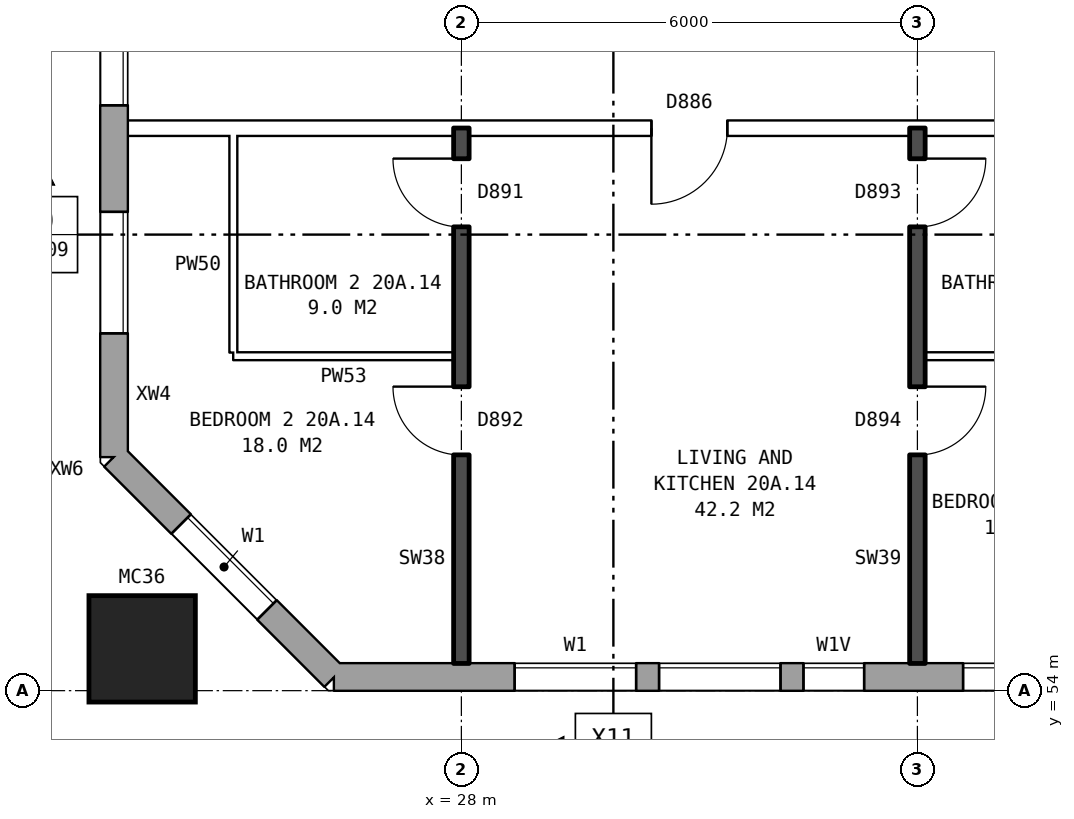
"""IFC4 building model, lengths in metres.
Left out: names, types, materials, properties, quantities, classifications, styles, units other than length and angle.
Written with IfcOpenShell. Run it as: python <this file> out.ifc"""

import sys

from ifc_helpers import new_model, si_unit, direction, frame, frame_2d, origin, origin_2d, place, context, subcontext, project, spatial, rectangle, hollow_rectangle, extrude, element, fill, save


model = new_model("IFC4")
c1 = context("Model", 3, precision=1e-05, world=origin(), true_north=direction((0.0, 1.0)))
c2 = subcontext(c1, "Body", "Model", "MODEL_VIEW")
j1 = project(units=[si_unit("LENGTHUNIT", "METRE"), si_unit("PLANEANGLEUNIT", "RADIAN")], contexts=[c1])
p1 = place(None, origin())
s1 = spatial("IfcSite", under=j1, at=p1, CompositionType="ELEMENT")
p2 = place(p1, origin())
s2 = spatial("IfcBuilding", under=s1, at=p2, CompositionType="ELEMENT")
p3 = place(p2, frame((0.0, 0.0, 74.7)))
s3 = spatial("IfcBuildingStorey", under=s2, at=p3, CompositionType="ELEMENT", Elevation=74.7)
p4 = place(p3, frame((23.8, 54.55, 0.0), z_axis=(0.0, 0.0, 1.0), x_axis=(1.0, 0.0, 0.0)))
e1 = element("IfcColumn", 1, at=p4, inside=s3, PredefinedType="COLUMN", context=c2, shape_type="SweptSolid", body=[
    extrude(hollow_rectangle(XDim=1.4, YDim=1.4, WallThickness=0.075, at=origin_2d()), origin(), (0.0, 0.0, 1.0), 3.1),
])
p5 = place(p3, frame((23.43, 57.075, 0.0), z_axis=(0.0, 0.0, 1.0), x_axis=(0.707106781187, -0.707106781187, 0.0)))
e2 = element("IfcWall", 2, at=p5, inside=s3, PredefinedType="STANDARD", context=c2, shape_type="SweptSolid", body=[
    extrude(rectangle(XDim=4.094, YDim=0.36, at=frame_2d((2.047, 0.0))), origin(), (0.0, 0.0, 1.0), 2.85),
])
p6 = place(p5, frame((1.247, 0.0, 0.8)))
e3 = element("IfcOpeningElement", 3, at=p6, cuts=e2, PredefinedType="OPENING", context=c2, shape_type="SweptSolid", body=[
    extrude(rectangle(XDim=1.6, YDim=1.8, at=frame_2d((0.8, 0.9))), frame((0.0, 0.19, 0.0), z_axis=(0.0, -1.0, 0.0), x_axis=(1.0, 0.0, 0.0)), (0.0, 0.0, 1.0), 0.38),
])
p7 = place(p3, frame((26.325, 54.18, 0.0), z_axis=(0.0, 0.0, 1.0), x_axis=(1.0, 0.0, 0.0)))
e4 = element("IfcWall", 4, at=p7, inside=s3, PredefinedType="STANDARD", context=c2, shape_type="SweptSolid", body=[
    extrude(rectangle(XDim=46.601, YDim=0.36, at=frame_2d((23.3, 0.0))), origin(), (0.0, 0.0, 1.0), 2.85),
])
p8 = place(p7, frame((2.375, 0.0, 0.8)))
e5 = element("IfcOpeningElement", 5, at=p8, cuts=e4, PredefinedType="OPENING", context=c2, shape_type="SweptSolid", body=[
    extrude(rectangle(XDim=1.6, YDim=1.8, at=frame_2d((0.8, 0.9))), frame((0.0, 0.19, 0.0), z_axis=(0.0, -1.0, 0.0), x_axis=(1.0, 0.0, 0.0)), (0.0, 0.0, 1.0), 0.38),
])
p9 = place(p7, frame((4.275, 0.0, 0.8)))
e6 = element("IfcOpeningElement", 6, at=p9, cuts=e4, PredefinedType="OPENING", context=c2, shape_type="SweptSolid", body=[
    extrude(rectangle(XDim=1.6, YDim=1.8, at=frame_2d((0.8, 0.9))), frame((0.0, 0.19, 0.0), z_axis=(0.0, -1.0, 0.0), x_axis=(1.0, 0.0, 0.0)), (0.0, 0.0, 1.0), 0.38),
])
p10 = place(p7, frame((8.275, 0.0, 0.8)))
e7 = element("IfcOpeningElement", 7, at=p10, cuts=e4, PredefinedType="OPENING", context=c2, shape_type="SweptSolid", body=[
    extrude(rectangle(XDim=0.8, YDim=0.9, at=frame_2d((0.4, 0.45))), frame((0.0, 0.19, 0.0), z_axis=(0.0, -1.0, 0.0), x_axis=(1.0, 0.0, 0.0)), (0.0, 0.0, 1.0), 0.38),
])
p11 = place(p7, frame((11.375, 0.0, 0.8)))
e8 = element("IfcOpeningElement", 8, at=p11, cuts=e4, PredefinedType="OPENING", context=c2, shape_type="SweptSolid", body=[
    extrude(rectangle(XDim=1.6, YDim=1.8, at=frame_2d((0.8, 0.9))), frame((0.0, 0.19, 0.0), z_axis=(0.0, -1.0, 0.0), x_axis=(1.0, 0.0, 0.0)), (0.0, 0.0, 1.0), 0.38),
])
p12 = place(p7, frame((14.375, 0.0, 0.8)))
e9 = element("IfcOpeningElement", 9, at=p12, cuts=e4, PredefinedType="OPENING", context=c2, shape_type="SweptSolid", body=[
    extrude(rectangle(XDim=1.6, YDim=1.8, at=frame_2d((0.8, 0.9))), frame((0.0, 0.19, 0.0), z_axis=(0.0, -1.0, 0.0), x_axis=(1.0, 0.0, 0.0)), (0.0, 0.0, 1.0), 0.38),
])
p13 = place(p7, frame((17.375, 0.0, 0.8)))
e10 = element("IfcOpeningElement", 10, at=p13, cuts=e4, PredefinedType="OPENING", context=c2, shape_type="SweptSolid", body=[
    extrude(rectangle(XDim=1.6, YDim=1.8, at=frame_2d((0.8, 0.9))), frame((0.0, 0.19, 0.0), z_axis=(0.0, -1.0, 0.0), x_axis=(1.0, 0.0, 0.0)), (0.0, 0.0, 1.0), 0.38),
])
p14 = place(p7, frame((20.375, 0.0, 0.8)))
e11 = element("IfcOpeningElement", 11, at=p14, cuts=e4, PredefinedType="OPENING", context=c2, shape_type="SweptSolid", body=[
    extrude(rectangle(XDim=1.6, YDim=1.8, at=frame_2d((0.8, 0.9))), frame((0.0, 0.19, 0.0), z_axis=(0.0, -1.0, 0.0), x_axis=(1.0, 0.0, 0.0)), (0.0, 0.0, 1.0), 0.38),
])
p15 = place(p7, frame((23.375, 0.0, 0.8)))
e12 = element("IfcOpeningElement", 12, at=p15, cuts=e4, PredefinedType="OPENING", context=c2, shape_type="SweptSolid", body=[
    extrude(rectangle(XDim=1.6, YDim=1.8, at=frame_2d((0.8, 0.9))), frame((0.0, 0.19, 0.0), z_axis=(0.0, -1.0, 0.0), x_axis=(1.0, 0.0, 0.0)), (0.0, 0.0, 1.0), 0.38),
])
p16 = place(p7, frame((26.375, 0.0, 0.8)))
e13 = element("IfcOpeningElement", 13, at=p16, cuts=e4, PredefinedType="OPENING", context=c2, shape_type="SweptSolid", body=[
    extrude(rectangle(XDim=1.6, YDim=1.8, at=frame_2d((0.8, 0.9))), frame((0.0, 0.19, 0.0), z_axis=(0.0, -1.0, 0.0), x_axis=(1.0, 0.0, 0.0)), (0.0, 0.0, 1.0), 0.38),
])
p17 = place(p7, frame((29.375, 0.0, 0.8)))
e14 = element("IfcOpeningElement", 14, at=p17, cuts=e4, PredefinedType="OPENING", context=c2, shape_type="SweptSolid", body=[
    extrude(rectangle(XDim=1.6, YDim=1.8, at=frame_2d((0.8, 0.9))), frame((0.0, 0.19, 0.0), z_axis=(0.0, -1.0, 0.0), x_axis=(1.0, 0.0, 0.0)), (0.0, 0.0, 1.0), 0.38),
])
p18 = place(p7, frame((32.375, 0.0, 0.8)))
e15 = element("IfcOpeningElement", 15, at=p18, cuts=e4, PredefinedType="OPENING", context=c2, shape_type="SweptSolid", body=[
    extrude(rectangle(XDim=1.6, YDim=1.8, at=frame_2d((0.8, 0.9))), frame((0.0, 0.19, 0.0), z_axis=(0.0, -1.0, 0.0), x_axis=(1.0, 0.0, 0.0)), (0.0, 0.0, 1.0), 0.38),
])
p19 = place(p7, frame((35.375, 0.0, 0.8)))
e16 = element("IfcOpeningElement", 16, at=p19, cuts=e4, PredefinedType="OPENING", context=c2, shape_type="SweptSolid", body=[
    extrude(rectangle(XDim=1.6, YDim=1.8, at=frame_2d((0.8, 0.9))), frame((0.0, 0.19, 0.0), z_axis=(0.0, -1.0, 0.0), x_axis=(1.0, 0.0, 0.0)), (0.0, 0.0, 1.0), 0.38),
])
p20 = place(p7, frame((39.625, 0.0, 1.7)))
e17 = element("IfcOpeningElement", 17, at=p20, cuts=e4, PredefinedType="OPENING", context=c2, shape_type="SweptSolid", body=[
    extrude(rectangle(XDim=1.4, YDim=0.9, at=frame_2d((0.7, 0.45))), frame((0.0, 0.19, 0.0), z_axis=(0.0, -1.0, 0.0), x_axis=(1.0, 0.0, 0.0)), (0.0, 0.0, 1.0), 0.38),
])
p21 = place(p7, frame((41.375, 0.0, 0.8)))
e18 = element("IfcOpeningElement", 18, at=p21, cuts=e4, PredefinedType="OPENING", context=c2, shape_type="SweptSolid", body=[
    extrude(rectangle(XDim=1.6, YDim=1.8, at=frame_2d((0.8, 0.9))), frame((0.0, 0.19, 0.0), z_axis=(0.0, -1.0, 0.0), x_axis=(1.0, 0.0, 0.0)), (0.0, 0.0, 1.0), 0.38),
])
p22 = place(p7, frame((44.375, 0.0, 0.8)))
e19 = element("IfcOpeningElement", 19, at=p22, cuts=e4, PredefinedType="OPENING", context=c2, shape_type="SweptSolid", body=[
    extrude(rectangle(XDim=1.6, YDim=1.8, at=frame_2d((0.8, 0.9))), frame((0.0, 0.19, 0.0), z_axis=(0.0, -1.0, 0.0), x_axis=(1.0, 0.0, 0.0)), (0.0, 0.0, 1.0), 0.38),
])
p23 = place(p7, frame((6.175, 0.0, 1.7)))
e20 = element("IfcOpeningElement", 20, at=p23, cuts=e4, PredefinedType="OPENING", context=c2, shape_type="SweptSolid", body=[
    extrude(rectangle(XDim=0.8, YDim=0.9, at=frame_2d((0.4, 0.45))), frame((0.0, 0.19, 0.0), z_axis=(0.0, -1.0, 0.0), x_axis=(1.0, 0.0, 0.0)), (0.0, 0.0, 1.0), 0.38),
])
p24 = place(p7, frame((9.375, 0.0, 0.8)))
e21 = element("IfcOpeningElement", 21, at=p24, cuts=e4, PredefinedType="OPENING", context=c2, shape_type="SweptSolid", body=[
    extrude(rectangle(XDim=1.0, YDim=1.8, at=frame_2d((0.5, 0.9))), frame((0.0, 0.19, 0.0), z_axis=(0.0, -1.0, 0.0), x_axis=(1.0, 0.0, 0.0)), (0.0, 0.0, 1.0), 0.38),
])
p25 = place(p3, frame((23.43, 82.925, 0.0), z_axis=(0.0, 0.0, 1.0), x_axis=(0.0, -1.0, 0.0)))
e22 = element("IfcWall", 22, at=p25, inside=s3, PredefinedType="STANDARD", context=c2, shape_type="SweptSolid", body=[
    extrude(rectangle(XDim=25.851, YDim=0.36, at=frame_2d((12.925, 0.0))), origin(), (0.0, 0.0, 1.0), 2.85),
])
p26 = place(p25, frame((1.625, 0.0, 0.8)))
e23 = element("IfcOpeningElement", 23, at=p26, cuts=e22, PredefinedType="OPENING", context=c2, shape_type="SweptSolid", body=[
    extrude(rectangle(XDim=1.6, YDim=1.8, at=frame_2d((0.8, 0.9))), frame((0.0, 0.19, 0.0), z_axis=(0.0, -1.0, 0.0), x_axis=(1.0, 0.0, 0.0)), (0.0, 0.0, 1.0), 0.38),
])
p27 = place(p25, frame((4.625, 0.0, 0.8)))
e24 = element("IfcOpeningElement", 24, at=p27, cuts=e22, PredefinedType="OPENING", context=c2, shape_type="SweptSolid", body=[
    extrude(rectangle(XDim=1.6, YDim=1.8, at=frame_2d((0.8, 0.9))), frame((0.0, 0.19, 0.0), z_axis=(0.0, -1.0, 0.0), x_axis=(1.0, 0.0, 0.0)), (0.0, 0.0, 1.0), 0.38),
])
p28 = place(p25, frame((6.525, 0.0, 0.8)))
e25 = element("IfcOpeningElement", 25, at=p28, cuts=e22, PredefinedType="OPENING", context=c2, shape_type="SweptSolid", body=[
    extrude(rectangle(XDim=1.2, YDim=1.8, at=frame_2d((0.6, 0.9))), frame((0.0, 0.19, 0.0), z_axis=(0.0, -1.0, 0.0), x_axis=(1.0, 0.0, 0.0)), (0.0, 0.0, 1.0), 0.38),
])
p29 = place(p25, frame((8.025, 0.0, 1.7)))
e26 = element("IfcOpeningElement", 26, at=p29, cuts=e22, PredefinedType="OPENING", context=c2, shape_type="SweptSolid", body=[
    extrude(rectangle(XDim=1.0, YDim=0.9, at=frame_2d((0.5, 0.45))), frame((0.0, 0.19, 0.0), z_axis=(0.0, -1.0, 0.0), x_axis=(1.0, 0.0, 0.0)), (0.0, 0.0, 1.0), 0.38),
])
p30 = place(p25, frame((10.125, 0.0, 0.8)))
e27 = element("IfcOpeningElement", 27, at=p30, cuts=e22, PredefinedType="OPENING", context=c2, shape_type="SweptSolid", body=[
    extrude(rectangle(XDim=0.8, YDim=0.9, at=frame_2d((0.4, 0.45))), frame((0.0, 0.19, 0.0), z_axis=(0.0, -1.0, 0.0), x_axis=(1.0, 0.0, 0.0)), (0.0, 0.0, 1.0), 0.38),
])
p31 = place(p25, frame((11.375, 0.0, 0.8)))
e28 = element("IfcOpeningElement", 28, at=p31, cuts=e22, PredefinedType="OPENING", context=c2, shape_type="SweptSolid", body=[
    extrude(rectangle(XDim=1.2, YDim=1.8, at=frame_2d((0.6, 0.9))), frame((0.0, 0.19, 0.0), z_axis=(0.0, -1.0, 0.0), x_axis=(1.0, 0.0, 0.0)), (0.0, 0.0, 1.0), 0.38),
])
p32 = place(p25, frame((19.625, 0.0, 0.8)))
e29 = element("IfcOpeningElement", 29, at=p32, cuts=e22, PredefinedType="OPENING", context=c2, shape_type="SweptSolid", body=[
    extrude(rectangle(XDim=1.6, YDim=1.8, at=frame_2d((0.8, 0.9))), frame((0.0, 0.19, 0.0), z_axis=(0.0, -1.0, 0.0), x_axis=(1.0, 0.0, 0.0)), (0.0, 0.0, 1.0), 0.38),
])
p33 = place(p25, frame((22.625, 0.0, 0.8)))
e30 = element("IfcOpeningElement", 30, at=p33, cuts=e22, PredefinedType="OPENING", context=c2, shape_type="SweptSolid", body=[
    extrude(rectangle(XDim=1.6, YDim=1.8, at=frame_2d((0.8, 0.9))), frame((0.0, 0.19, 0.0), z_axis=(0.0, -1.0, 0.0), x_axis=(1.0, 0.0, 0.0)), (0.0, 0.0, 1.0), 0.38),
])
p34 = place(p25, frame((12.875, 0.0, 0.8)))
e31 = element("IfcOpeningElement", 31, at=p34, cuts=e22, PredefinedType="OPENING", context=c2, shape_type="SweptSolid", body=[
    extrude(rectangle(XDim=1.6, YDim=1.8, at=frame_2d((0.8, 0.9))), frame((0.0, 0.19, 0.0), z_axis=(0.0, -1.0, 0.0), x_axis=(1.0, 0.0, 0.0)), (0.0, 0.0, 1.0), 0.38),
])
p35 = place(p25, frame((14.775, 0.0, 0.8)))
e32 = element("IfcOpeningElement", 32, at=p35, cuts=e22, PredefinedType="OPENING", context=c2, shape_type="SweptSolid", body=[
    extrude(rectangle(XDim=0.8, YDim=0.9, at=frame_2d((0.4, 0.45))), frame((0.0, 0.19, 0.0), z_axis=(0.0, -1.0, 0.0), x_axis=(1.0, 0.0, 0.0)), (0.0, 0.0, 1.0), 0.38),
])
p36 = place(p25, frame((16.725, 0.0, 1.7)))
e33 = element("IfcOpeningElement", 33, at=p36, cuts=e22, PredefinedType="OPENING", context=c2, shape_type="SweptSolid", body=[
    extrude(rectangle(XDim=1.0, YDim=0.9, at=frame_2d((0.5, 0.45))), frame((0.0, 0.19, 0.0), z_axis=(0.0, -1.0, 0.0), x_axis=(1.0, 0.0, 0.0)), (0.0, 0.0, 1.0), 0.38),
])
p37 = place(p25, frame((18.025, 0.0, 0.8)))
e34 = element("IfcOpeningElement", 34, at=p37, cuts=e22, PredefinedType="OPENING", context=c2, shape_type="SweptSolid", body=[
    extrude(rectangle(XDim=1.2, YDim=1.8, at=frame_2d((0.6, 0.9))), frame((0.0, 0.19, 0.0), z_axis=(0.0, -1.0, 0.0), x_axis=(1.0, 0.0, 0.0)), (0.0, 0.0, 1.0), 0.38),
])
p38 = place(p3, frame((25.0, 58.4, 0.0), z_axis=(0.0, 0.0, 1.0), x_axis=(1.0, 0.0, 0.0)))
e35 = element("IfcWall", 35, at=p38, inside=s3, PredefinedType="PARTITIONING", context=c2, shape_type="SweptSolid", body=[
    extrude(rectangle(XDim=2.9, YDim=0.1, at=frame_2d((1.45, 0.0))), origin(), (0.0, 0.0, 1.0), 2.85),
])
p39 = place(p3, frame((34.1, 58.4, 0.0), z_axis=(0.0, 0.0, 1.0), x_axis=(1.0, 0.0, 0.0)))
e36 = element("IfcWall", 36, at=p39, inside=s3, PredefinedType="PARTITIONING", context=c2, shape_type="SweptSolid", body=[
    extrude(rectangle(XDim=2.8, YDim=0.1, at=frame_2d((1.4, 0.0))), origin(), (0.0, 0.0, 1.0), 2.85),
])
p40 = place(p3, frame((23.61, 61.4, 0.0), z_axis=(0.0, 0.0, 1.0), x_axis=(1.0, 0.0, 0.0)))
e37 = element("IfcWall", 37, at=p40, inside=s3, PredefinedType="PARTITIONING", context=c2, shape_type="SweptSolid", body=[
    extrude(rectangle(XDim=22.29, YDim=0.2, at=frame_2d((11.145, 0.0))), origin(), (0.0, 0.0, 1.0), 2.85),
])
p41 = place(p40, frame((18.84, 0.0, 0.0)))
e38 = element("IfcOpeningElement", 38, at=p41, cuts=e37, PredefinedType="OPENING", context=c2, shape_type="SweptSolid", body=[
    extrude(rectangle(XDim=1.0, YDim=2.1, at=frame_2d((0.5, 1.05))), frame((0.0, 0.11, 0.0), z_axis=(0.0, -1.0, 0.0), x_axis=(1.0, 0.0, 0.0)), (0.0, 0.0, 1.0), 0.22),
])
p42 = place(p40, frame((6.89, 0.0, 0.0)))
e39 = element("IfcOpeningElement", 39, at=p42, cuts=e37, PredefinedType="OPENING", context=c2, shape_type="SweptSolid", body=[
    extrude(rectangle(XDim=1.0, YDim=2.1, at=frame_2d((0.5, 1.05))), frame((0.0, 0.11, 0.0), z_axis=(0.0, -1.0, 0.0), x_axis=(1.0, 0.0, 0.0)), (0.0, 0.0, 1.0), 0.22),
])
p43 = place(p3, frame((25.0, 58.45, 0.0), z_axis=(0.0, 0.0, 1.0), x_axis=(0.0, 1.0, 0.0)))
e40 = element("IfcWall", 40, at=p43, inside=s3, PredefinedType="PARTITIONING", context=c2, shape_type="SweptSolid", body=[
    extrude(rectangle(XDim=2.85, YDim=0.1, at=frame_2d((1.425, 0.0))), origin(), (0.0, 0.0, 1.0), 2.85),
])
p44 = place(p3, frame((28.0, 54.36, 0.0), z_axis=(0.0, 0.0, 1.0), x_axis=(0.0, 1.0, 0.0)))
e41 = element("IfcWall", 41, at=p44, inside=s3, PredefinedType="SOLIDWALL", context=c2, shape_type="SweptSolid", body=[
    extrude(rectangle(XDim=7.04, YDim=0.2, at=frame_2d((3.52, 0.0))), origin(), (0.0, 0.0, 1.0), 2.85),
])
p45 = place(p44, frame((2.74, 0.0, 0.0)))
e42 = element("IfcOpeningElement", 42, at=p45, cuts=e41, PredefinedType="OPENING", context=c2, shape_type="SweptSolid", body=[
    extrude(rectangle(XDim=0.9, YDim=2.1, at=frame_2d((0.45, 1.05))), frame((0.0, 0.11, 0.0), z_axis=(0.0, -1.0, 0.0), x_axis=(1.0, 0.0, 0.0)), (0.0, 0.0, 1.0), 0.22),
])
p46 = place(p44, frame((5.74, 0.0, 0.0)))
e43 = element("IfcOpeningElement", 43, at=p46, cuts=e41, PredefinedType="OPENING", context=c2, shape_type="SweptSolid", body=[
    extrude(rectangle(XDim=0.9, YDim=2.1, at=frame_2d((0.45, 1.05))), frame((0.0, 0.11, 0.0), z_axis=(0.0, -1.0, 0.0), x_axis=(1.0, 0.0, 0.0)), (0.0, 0.0, 1.0), 0.22),
])
p47 = place(p3, frame((34.0, 54.36, 0.0), z_axis=(0.0, 0.0, 1.0), x_axis=(0.0, 1.0, 0.0)))
e44 = element("IfcWall", 44, at=p47, inside=s3, PredefinedType="SOLIDWALL", context=c2, shape_type="SweptSolid", body=[
    extrude(rectangle(XDim=7.04, YDim=0.2, at=frame_2d((3.52, 0.0))), origin(), (0.0, 0.0, 1.0), 2.85),
])
p48 = place(p47, frame((2.74, 0.0, 0.0)))
e45 = element("IfcOpeningElement", 45, at=p48, cuts=e44, PredefinedType="OPENING", context=c2, shape_type="SweptSolid", body=[
    extrude(rectangle(XDim=0.9, YDim=2.1, at=frame_2d((0.45, 1.05))), frame((0.0, 0.11, 0.0), z_axis=(0.0, -1.0, 0.0), x_axis=(1.0, 0.0, 0.0)), (0.0, 0.0, 1.0), 0.22),
])
p49 = place(p47, frame((5.74, 0.0, 0.0)))
e46 = element("IfcOpeningElement", 46, at=p49, cuts=e44, PredefinedType="OPENING", context=c2, shape_type="SweptSolid", body=[
    extrude(rectangle(XDim=0.9, YDim=2.1, at=frame_2d((0.45, 1.05))), frame((0.0, 0.11, 0.0), z_axis=(0.0, -1.0, 0.0), x_axis=(1.0, 0.0, 0.0)), (0.0, 0.0, 1.0), 0.22),
])
p50 = place(p6, origin())
e47 = element("IfcWindow", 47, at=p50, inside=s3, PartitioningType="SINGLE_PANEL", PredefinedType="WINDOW", context=c2, shape_type="SweptSolid", body=[
    extrude(rectangle(XDim=1.6, YDim=1.8, at=frame_2d((0.8, 0.9))), frame((0.0, 0.15, 0.0), z_axis=(0.0, -1.0, 0.0), x_axis=(1.0, 0.0, 0.0)), (0.0, 0.0, 1.0), 0.06),
])
fill(e3, e47)
p51 = place(p8, origin())
e48 = element("IfcWindow", 48, at=p51, inside=s3, PartitioningType="SINGLE_PANEL", PredefinedType="WINDOW", context=c2, shape_type="SweptSolid", body=[
    extrude(rectangle(XDim=1.6, YDim=1.8, at=frame_2d((0.8, 0.9))), frame((0.0, 0.15, 0.0), z_axis=(0.0, -1.0, 0.0), x_axis=(1.0, 0.0, 0.0)), (0.0, 0.0, 1.0), 0.06),
])
fill(e5, e48)
p52 = place(p9, origin())
e49 = element("IfcWindow", 49, at=p52, inside=s3, PartitioningType="SINGLE_PANEL", PredefinedType="WINDOW", context=c2, shape_type="SweptSolid", body=[
    extrude(rectangle(XDim=1.6, YDim=1.8, at=frame_2d((0.8, 0.9))), frame((0.0, 0.15, 0.0), z_axis=(0.0, -1.0, 0.0), x_axis=(1.0, 0.0, 0.0)), (0.0, 0.0, 1.0), 0.06),
])
fill(e6, e49)
p53 = place(p10, origin())
e50 = element("IfcWindow", 50, at=p53, inside=s3, PartitioningType="SINGLE_PANEL", PredefinedType="WINDOW", context=c2, shape_type="SweptSolid", body=[
    extrude(rectangle(XDim=0.8, YDim=0.9, at=frame_2d((0.4, 0.45))), frame((0.0, 0.15, 0.0), z_axis=(0.0, -1.0, 0.0), x_axis=(1.0, 0.0, 0.0)), (0.0, 0.0, 1.0), 0.06),
])
fill(e7, e50)
p54 = place(p32, origin())
e51 = element("IfcWindow", 51, at=p54, inside=s3, PartitioningType="SINGLE_PANEL", PredefinedType="WINDOW", context=c2, shape_type="SweptSolid", body=[
    extrude(rectangle(XDim=1.6, YDim=1.8, at=frame_2d((0.8, 0.9))), frame((0.0, 0.15, 0.0), z_axis=(0.0, -1.0, 0.0), x_axis=(1.0, 0.0, 0.0)), (0.0, 0.0, 1.0), 0.06),
])
fill(e29, e51)
p55 = place(p33, origin())
e52 = element("IfcWindow", 52, at=p55, inside=s3, PartitioningType="SINGLE_PANEL", PredefinedType="WINDOW", context=c2, shape_type="SweptSolid", body=[
    extrude(rectangle(XDim=1.6, YDim=1.8, at=frame_2d((0.8, 0.9))), frame((0.0, 0.15, 0.0), z_axis=(0.0, -1.0, 0.0), x_axis=(1.0, 0.0, 0.0)), (0.0, 0.0, 1.0), 0.06),
])
fill(e30, e52)
p56 = place(p48, frame((0.9, 0.0, 0.0), z_axis=(0.0, 0.0, 1.0), x_axis=(-1.0, 0.0, 0.0)))
e53 = element("IfcDoor", 53, at=p56, inside=s3, OperationType="SINGLE_SWING_LEFT", PredefinedType="DOOR", context=c2, shape_type="SweptSolid", body=[
    extrude(rectangle(XDim=0.9, YDim=2.1, at=frame_2d((0.45, 1.05))), frame((0.0, 0.025, 0.0), z_axis=(0.0, -1.0, 0.0), x_axis=(1.0, 0.0, 0.0)), (0.0, 0.0, 1.0), 0.05),
])
fill(e45, e53)
p57 = place(p45, origin())
e54 = element("IfcDoor", 54, at=p57, inside=s3, OperationType="SINGLE_SWING_RIGHT", PredefinedType="DOOR", context=c2, shape_type="SweptSolid", body=[
    extrude(rectangle(XDim=0.9, YDim=2.1, at=frame_2d((0.45, 1.05))), frame((0.0, 0.025, 0.0), z_axis=(0.0, -1.0, 0.0), x_axis=(1.0, 0.0, 0.0)), (0.0, 0.0, 1.0), 0.05),
])
fill(e42, e54)
p58 = place(p42, frame((1.0, 0.0, 0.0), z_axis=(0.0, 0.0, 1.0), x_axis=(-1.0, 0.0, 0.0)))
e55 = element("IfcDoor", 55, at=p58, inside=s3, OperationType="SINGLE_SWING_RIGHT", PredefinedType="DOOR", context=c2, shape_type="SweptSolid", body=[
    extrude(rectangle(XDim=1.0, YDim=2.1, at=frame_2d((0.5, 1.05))), frame((0.0, 0.025, 0.0), z_axis=(0.0, -1.0, 0.0), x_axis=(1.0, 0.0, 0.0)), (0.0, 0.0, 1.0), 0.05),
])
fill(e39, e55)
p59 = place(p49, frame((0.9, 0.0, 0.0), z_axis=(0.0, 0.0, 1.0), x_axis=(-1.0, 0.0, 0.0)))
e56 = element("IfcDoor", 56, at=p59, inside=s3, OperationType="SINGLE_SWING_LEFT", PredefinedType="DOOR", context=c2, shape_type="SweptSolid", body=[
    extrude(rectangle(XDim=0.9, YDim=2.1, at=frame_2d((0.45, 1.05))), frame((0.0, 0.025, 0.0), z_axis=(0.0, -1.0, 0.0), x_axis=(1.0, 0.0, 0.0)), (0.0, 0.0, 1.0), 0.05),
])
fill(e46, e56)
p60 = place(p46, origin())
e57 = element("IfcDoor", 57, at=p60, inside=s3, OperationType="SINGLE_SWING_RIGHT", PredefinedType="DOOR", context=c2, shape_type="SweptSolid", body=[
    extrude(rectangle(XDim=0.9, YDim=2.1, at=frame_2d((0.45, 1.05))), frame((0.0, 0.025, 0.0), z_axis=(0.0, -1.0, 0.0), x_axis=(1.0, 0.0, 0.0)), (0.0, 0.0, 1.0), 0.05),
])
fill(e43, e57)
p61 = place(p23, origin())
e58 = element("IfcWindow", 58, at=p61, inside=s3, PartitioningType="SINGLE_PANEL", PredefinedType="WINDOW", context=c2, shape_type="SweptSolid", body=[
    extrude(rectangle(XDim=0.8, YDim=0.9, at=frame_2d((0.4, 0.45))), frame((0.0, 0.15, 0.0), z_axis=(0.0, -1.0, 0.0), x_axis=(1.0, 0.0, 0.0)), (0.0, 0.0, 1.0), 0.06),
])
fill(e20, e58)
save(model, sys.argv[1])
